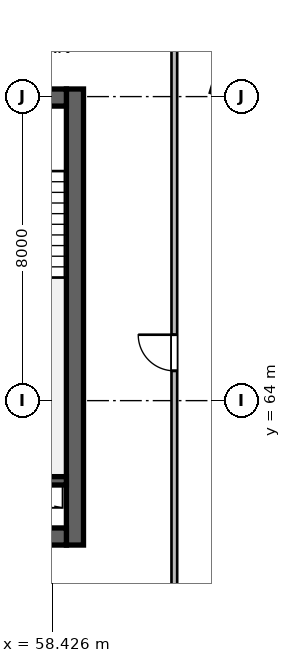
"""IFC4 building model, lengths in metres.
Left out: names, types, materials, properties, quantities, classifications, styles, units other than length and angle.
Written with IfcOpenShell. Run it as: python <this file> out.ifc"""

import sys

from ifc_helpers import new_model, si_unit, direction, frame, frame_2d, origin, place, context, subcontext, project, spatial, rectangle, extrude, source, transform, mapped, element, fill, save


model = new_model("IFC4")
c1 = context("Model", 3, precision=1e-05, world=origin(), true_north=direction((0.0, 1.0)))
c2 = subcontext(c1, "Body", "Model", "MODEL_VIEW")
j1 = project(units=[si_unit("LENGTHUNIT", "METRE"), si_unit("PLANEANGLEUNIT", "RADIAN")], contexts=[c1])
p1 = place(None, origin())
s1 = spatial("IfcSite", under=j1, at=p1, CompositionType="ELEMENT")
p2 = place(p1, origin())
s2 = spatial("IfcBuilding", under=s1, at=p2, CompositionType="ELEMENT")
p3 = place(p2, frame((0.0, 0.0, 204.0)))
s3 = spatial("IfcBuildingStorey", under=s2, at=p3, CompositionType="ELEMENT", Elevation=204.0)
m1 = source(origin(), c2, "Body", "SweptSolid", [
    extrude(rectangle(XDim=12.0, YDim=0.45, at=frame_2d((6.0, 0.0))), origin(), (0.0, 0.0, 1.0), 3.9),
])
p4 = place(p3, frame((59.025, 60.2, 0.0), z_axis=(0.0, 0.0, 1.0), x_axis=(0.0, 1.0, 0.0)))
e1 = element("IfcWall", 1, at=p4, inside=s3, PredefinedType="SHEAR", context=c2, shape_type="MappedRepresentation", body=[
    mapped(m1, transform((0.0, 0.0, 0.0), scale=1.0)),
])
m2 = source(origin(), c2, "Body", "SweptSolid", [
    extrude(rectangle(XDim=21.6, YDim=0.45, at=frame_2d((10.8, 0.0))), origin(), (0.0, 0.0, 1.0), 3.9),
])
p5 = place(p3, frame((37.2, 60.425, 0.0), z_axis=(0.0, 0.0, 1.0), x_axis=(1.0, 0.0, 0.0)))
e2 = element("IfcWall", 2, at=p5, inside=s3, PredefinedType="SHEAR", context=c2, shape_type="MappedRepresentation", body=[
    mapped(m2, transform((0.0, 0.0, 0.0), scale=1.0)),
])
p6 = place(p5, frame((1.1, 0.0, 0.0)))
e3 = element("IfcOpeningElement", 3, at=p6, cuts=e2, PredefinedType="OPENING", context=c2, shape_type="SweptSolid", body=[
    extrude(rectangle(XDim=1.15, YDim=2.15, at=frame_2d((0.575, 1.075))), frame((0.0, 0.235, 0.0), z_axis=(0.0, -1.0, 0.0), x_axis=(1.0, 0.0, 0.0)), (0.0, 0.0, 1.0), 0.47),
])
p7 = place(p5, frame((19.5, 0.0, 0.0)))
e4 = element("IfcOpeningElement", 4, at=p7, cuts=e2, PredefinedType="OPENING", context=c2, shape_type="SweptSolid", body=[
    extrude(rectangle(XDim=0.9, YDim=2.1, at=frame_2d((0.45, 1.05))), frame((0.0, 0.235, 0.0), z_axis=(0.0, -1.0, 0.0), x_axis=(1.0, 0.0, 0.0)), (0.0, 0.0, 1.0), 0.47),
])
p8 = place(p5, frame((12.02, 0.0, 0.0)))
e5 = element("IfcOpeningElement", 5, at=p8, cuts=e2, PredefinedType="OPENING", context=c2, shape_type="SweptSolid", body=[
    extrude(rectangle(XDim=1.6, YDim=2.15, at=frame_2d((0.8, 1.075))), frame((0.0, 0.235, 0.0), z_axis=(0.0, -1.0, 0.0), x_axis=(1.0, 0.0, 0.0)), (0.0, 0.0, 1.0), 0.47),
])
p9 = place(p3, frame((37.2, 71.975, 0.0), z_axis=(0.0, 0.0, 1.0), x_axis=(1.0, 0.0, 0.0)))
e6 = element("IfcWall", 6, at=p9, inside=s3, PredefinedType="SHEAR", context=c2, shape_type="MappedRepresentation", body=[
    mapped(m2, transform((0.0, 0.0, 0.0), scale=1.0)),
])
p10 = place(p9, frame((1.2, 0.0, 0.0)))
e7 = element("IfcOpeningElement", 7, at=p10, cuts=e6, PredefinedType="OPENING", context=c2, shape_type="SweptSolid", body=[
    extrude(rectangle(XDim=0.9, YDim=2.1, at=frame_2d((0.45, 1.05))), frame((0.0, 0.235, 0.0), z_axis=(0.0, -1.0, 0.0), x_axis=(1.0, 0.0, 0.0)), (0.0, 0.0, 1.0), 0.47),
])
p11 = place(p9, frame((14.7, 0.0, 0.0)))
e8 = element("IfcOpeningElement", 8, at=p11, cuts=e6, PredefinedType="OPENING", context=c2, shape_type="SweptSolid", body=[
    extrude(rectangle(XDim=1.2, YDim=2.15, at=frame_2d((0.6, 1.075))), frame((0.0, 0.235, 0.0), z_axis=(0.0, -1.0, 0.0), x_axis=(1.0, 0.0, 0.0)), (0.0, 0.0, 1.0), 0.47),
])
p12 = place(p9, frame((4.15, 0.0, 0.0)))
e9 = element("IfcOpeningElement", 9, at=p12, cuts=e6, PredefinedType="OPENING", context=c2, shape_type="SweptSolid", body=[
    extrude(rectangle(XDim=1.3, YDim=2.15, at=frame_2d((0.65, 1.075))), frame((0.0, 0.235, 0.0), z_axis=(0.0, -1.0, 0.0), x_axis=(1.0, 0.0, 0.0)), (0.0, 0.0, 1.0), 0.47),
])
p13 = place(p9, frame((7.25, 0.0, 0.0)))
e10 = element("IfcOpeningElement", 10, at=p13, cuts=e6, PredefinedType="OPENING", context=c2, shape_type="SweptSolid", body=[
    extrude(rectangle(XDim=0.9, YDim=2.1, at=frame_2d((0.45, 1.05))), frame((0.0, 0.235, 0.0), z_axis=(0.0, -1.0, 0.0), x_axis=(1.0, 0.0, 0.0)), (0.0, 0.0, 1.0), 0.47),
])
p14 = place(p9, frame((10.95, 0.0, 0.0)))
e11 = element("IfcOpeningElement", 11, at=p14, cuts=e6, PredefinedType="OPENING", context=c2, shape_type="SweptSolid", body=[
    extrude(rectangle(XDim=0.9, YDim=2.1, at=frame_2d((0.45, 1.05))), frame((0.0, 0.235, 0.0), z_axis=(0.0, -1.0, 0.0), x_axis=(1.0, 0.0, 0.0)), (0.0, 0.0, 1.0), 0.47),
])
m3 = source(origin(), c2, "Body", "SweptSolid", [
    extrude(rectangle(XDim=3.27, YDim=0.22, at=frame_2d((1.635, 0.0))), origin(), (0.0, 0.0, 1.0), 3.9),
])
p15 = place(p3, frame((55.53, 61.89, 0.0), z_axis=(0.0, 0.0, 1.0), x_axis=(1.0, 0.0, 0.0)))
e12 = element("IfcWall", 12, at=p15, inside=s3, PredefinedType="SHEAR", context=c2, shape_type="MappedRepresentation", body=[
    mapped(m3, transform((0.0, 0.0, 0.0), scale=1.0)),
])
m4 = source(origin(), c2, "Body", "SweptSolid", [
    extrude(rectangle(XDim=19.209, YDim=0.15, at=frame_2d((9.604, 0.0))), origin(), (0.0, 0.0, 1.0), 3.64),
])
p16 = place(p3, frame((61.64, 57.96, 0.0), z_axis=(0.0, 0.0, 1.0), x_axis=(0.0, 1.0, 0.0)))
e13 = element("IfcWall", 13, at=p16, inside=s3, PredefinedType="PARTITIONING", context=c2, shape_type="MappedRepresentation", body=[
    mapped(m4, transform((0.0, 0.0, 0.0), scale=1.0)),
])
p17 = place(p16, frame((6.824, 0.0, 0.0)))
e14 = element("IfcOpeningElement", 14, at=p17, cuts=e13, PredefinedType="OPENING", context=c2, shape_type="SweptSolid", body=[
    extrude(rectangle(XDim=0.95, YDim=2.1, at=frame_2d((0.475, 1.05))), frame((0.0, 0.085, 0.0), z_axis=(0.0, -1.0, 0.0), x_axis=(1.0, 0.0, 0.0)), (0.0, 0.0, 1.0), 0.17),
])
m5 = source(origin(), c2, "Body", "SweptSolid", [
    extrude(rectangle(XDim=0.95, YDim=2.1, at=frame_2d((0.475, 1.05))), frame((0.0, 0.025, 0.0), z_axis=(0.0, -1.0, 0.0), x_axis=(1.0, 0.0, 0.0)), (0.0, 0.0, 1.0), 0.05),
])
p18 = place(p17, origin())
e15 = element("IfcDoor", 15, at=p18, inside=s3, OperationType="SINGLE_SWING_RIGHT", PredefinedType="DOOR", context=c2, shape_type="MappedRepresentation", body=[
    mapped(m5, transform((0.0, 0.0, 0.0), scale=1.0)),
])
fill(e14, e15)
save(model, sys.argv[1])
